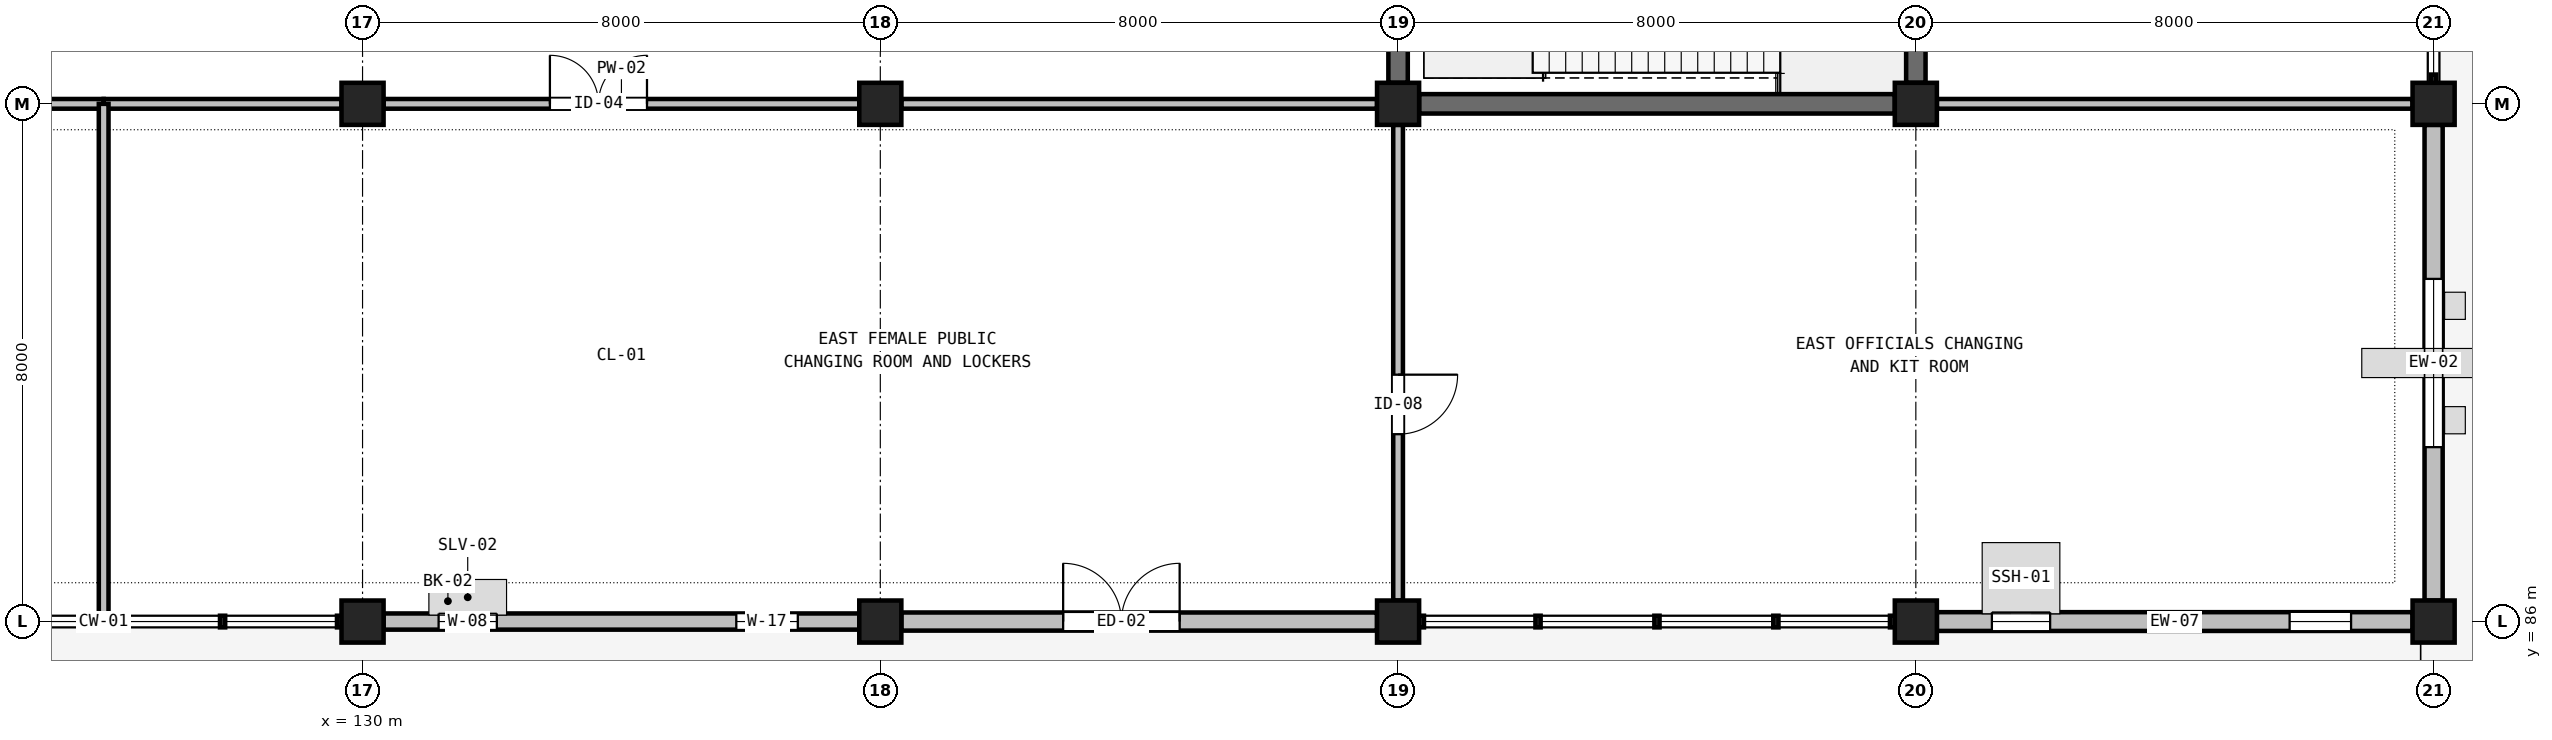
"""IFC4 building model, lengths in metres.
Left out: names, types, materials, properties, quantities, classifications, styles, units other than length and angle.
Written with IfcOpenShell. Run it as: python <this file> out.ifc"""

import sys

from ifc_helpers import new_model, si_unit, direction, frame, frame_2d, origin, origin_2d, place, context, subcontext, project, spatial, rectangle, circle, extrude, element, fill, save


model = new_model("IFC4")
c1 = context("Model", 3, precision=1e-05, world=origin(), true_north=direction((0.0, 1.0)))
c2 = subcontext(c1, "Body", "Model", "MODEL_VIEW")
j1 = project(units=[si_unit("LENGTHUNIT", "METRE"), si_unit("PLANEANGLEUNIT", "RADIAN")], contexts=[c1])
p1 = place(None, origin())
s1 = spatial("IfcSite", under=j1, at=p1, CompositionType="ELEMENT")
p2 = place(p1, origin())
s2 = spatial("IfcBuilding", under=s1, at=p2, CompositionType="ELEMENT")
p3 = place(p2, origin())
s3 = spatial("IfcBuildingStorey", under=s2, at=p3, CompositionType="ELEMENT", Elevation=0.0)
for number, where, z_axis, x_axis in (
    (1, (130.0, 86.0, 0.0), (0.0, 0.0, 1.0), (1.0, 0.0, 0.0)),
    (2, (130.0, 94.0, 0.0), (0.0, 0.0, 1.0), (1.0, 0.0, 0.0)),
    (3, (138.0, 86.0, 0.0), (0.0, 0.0, 1.0), (1.0, 0.0, 0.0)),
    (4, (138.0, 94.0, 0.0), (0.0, 0.0, 1.0), (1.0, 0.0, 0.0)),
    (5, (146.0, 86.0, 0.0), (0.0, 0.0, 1.0), (1.0, 0.0, 0.0)),
    (6, (146.0, 94.0, 0.0), (0.0, 0.0, 1.0), (1.0, 0.0, 0.0)),
    (7, (154.0, 86.0, 0.0), (0.0, 0.0, 1.0), (1.0, 0.0, 0.0)),
    (8, (154.0, 94.0, 0.0), (0.0, 0.0, 1.0), (1.0, 0.0, 0.0)),
    (9, (162.0, 86.0, 0.0), (0.0, 0.0, 1.0), (1.0, 0.0, 0.0)),
    (10, (162.0, 94.0, 0.0), (0.0, 0.0, 1.0), (1.0, 0.0, 0.0)),
):
    element("IfcColumn", number, at=place(p3, frame(where, z_axis=z_axis, x_axis=x_axis)), inside=s3, PredefinedType="COLUMN", context=c2, shape_type="SweptSolid", body=[
        extrude(circle(Radius=0.325, at=origin_2d()), origin(), (0.0, 0.0, 1.0), 5.4),
    ])
p4 = place(p3, frame((130.325, 86.0, 0.0), z_axis=(0.0, 0.0, 1.0), x_axis=(1.0, 0.0, 0.0)))
e11 = element("IfcWall", 11, at=p4, inside=s3, PredefinedType="SOLIDWALL", context=c2, shape_type="SweptSolid", body=[
    extrude(rectangle(XDim=7.35, YDim=0.25, at=frame_2d((3.675, 0.0))), origin(), (0.0, 0.0, 1.0), 4.24),
])
p5 = place(p4, frame((0.85, 0.0, 1.5)))
e12 = element("IfcOpeningElement", 12, at=p5, cuts=e11, PredefinedType="OPENING", context=c2, shape_type="SweptSolid", body=[
    extrude(rectangle(XDim=0.9, YDim=1.2, at=frame_2d((0.45, 0.6))), frame((0.0, 0.135, 0.0), z_axis=(0.0, -1.0, 0.0), x_axis=(1.0, 0.0, 0.0)), (0.0, 0.0, 1.0), 0.27),
])
p6 = place(p4, frame((5.45, 0.0, 1.05)))
e13 = element("IfcOpeningElement", 13, at=p6, cuts=e11, PredefinedType="OPENING", context=c2, shape_type="SweptSolid", body=[
    extrude(rectangle(XDim=0.95, YDim=1.65, at=frame_2d((0.475, 0.825))), frame((0.0, 0.135, 0.0), z_axis=(0.0, -1.0, 0.0), x_axis=(1.0, 0.0, 0.0)), (0.0, 0.0, 1.0), 0.27),
])
p7 = place(p3, frame((138.325, 86.0, 0.0), z_axis=(0.0, 0.0, 1.0), x_axis=(1.0, 0.0, 0.0)))
e14 = element("IfcWall", 14, at=p7, inside=s3, PredefinedType="SOLIDWALL", context=c2, shape_type="SweptSolid", body=[
    extrude(rectangle(XDim=7.35, YDim=0.28, at=frame_2d((3.675, 0.0))), origin(), (0.0, 0.0, 1.0), 4.24),
])
p8 = place(p7, frame((2.5, 0.0, 0.0)))
e15 = element("IfcOpeningElement", 15, at=p8, cuts=e14, PredefinedType="OPENING", context=c2, shape_type="SweptSolid", body=[
    extrude(rectangle(XDim=1.8, YDim=2.3, at=frame_2d((0.9, 1.15))), frame((0.0, 0.15, 0.0), z_axis=(0.0, -1.0, 0.0), x_axis=(1.0, 0.0, 0.0)), (0.0, 0.0, 1.0), 0.3),
])
p9 = place(p3, frame((154.325, 86.0, 0.0), z_axis=(0.0, 0.0, 1.0), x_axis=(1.0, 0.0, 0.0)))
e16 = element("IfcWall", 16, at=p9, inside=s3, PredefinedType="SOLIDWALL", context=c2, shape_type="SweptSolid", body=[
    extrude(rectangle(XDim=7.35, YDim=0.29, at=frame_2d((3.675, 0.0))), origin(), (0.0, 0.0, 1.0), 4.14),
])
p10 = place(p9, frame((0.85, 0.0, 1.5)))
e17 = element("IfcOpeningElement", 17, at=p10, cuts=e16, PredefinedType="OPENING", context=c2, shape_type="SweptSolid", body=[
    extrude(rectangle(XDim=0.9, YDim=1.2, at=frame_2d((0.45, 0.6))), frame((0.0, 0.155, 0.0), z_axis=(0.0, -1.0, 0.0), x_axis=(1.0, 0.0, 0.0)), (0.0, 0.0, 1.0), 0.31),
])
p11 = place(p9, frame((5.45, 0.0, 1.05)))
e18 = element("IfcOpeningElement", 18, at=p11, cuts=e16, PredefinedType="OPENING", context=c2, shape_type="SweptSolid", body=[
    extrude(rectangle(XDim=0.95, YDim=1.65, at=frame_2d((0.475, 0.825))), frame((0.0, 0.155, 0.0), z_axis=(0.0, -1.0, 0.0), x_axis=(1.0, 0.0, 0.0)), (0.0, 0.0, 1.0), 0.31),
])
p12 = place(p3, frame((162.0, 86.325, 0.0), z_axis=(0.0, 0.0, 1.0), x_axis=(0.0, 1.0, 0.0)))
e19 = element("IfcWall", 19, at=p12, inside=s3, PredefinedType="SOLIDWALL", context=c2, shape_type="SweptSolid", body=[
    extrude(rectangle(XDim=7.35, YDim=0.28, at=frame_2d((3.675, 0.0))), origin(), (0.0, 0.0, 1.0), 4.42),
])
p13 = place(p12, frame((2.37, 0.0, 2.65)))
e20 = element("IfcOpeningElement", 20, at=p13, cuts=e19, PredefinedType="OPENING", context=c2, shape_type="SweptSolid", body=[
    extrude(rectangle(XDim=2.6, YDim=1.1, at=frame_2d((1.3, 0.55))), frame((0.0, 0.15, 0.0), z_axis=(0.0, -1.0, 0.0), x_axis=(1.0, 0.0, 0.0)), (0.0, 0.0, 1.0), 0.3),
])
for number, where, z_axis, x_axis in (
    (21, (146.325, 94.0, 0.0), (0.0, 0.0, 1.0), (1.0, 0.0, 0.0)),
    (22, (146.0, 94.325, 0.0), (0.0, 0.0, 1.0), (0.0, 1.0, 0.0)),
    (23, (154.0, 94.325, 0.0), (0.0, 0.0, 1.0), (0.0, 1.0, 0.0)),
):
    element("IfcWall", number, at=place(p3, frame(where, z_axis=z_axis, x_axis=x_axis)), inside=s3, PredefinedType="SHEAR", context=c2, shape_type="SweptSolid", body=[
        extrude(rectangle(XDim=7.35, YDim=0.3, at=frame_2d((3.675, 0.0))), origin(), (0.0, 0.0, 1.0), 5.18),
    ])
for number, where, z_axis, x_axis in (
    (24, (122.325, 94.0, 0.0), (0.0, 0.0, 1.0), (1.0, 0.0, 0.0)),
    (25, (126.0, 94.0, 0.0), (0.0, 0.0, 1.0), (1.0, 0.0, 0.0)),
):
    element("IfcWall", number, at=place(p3, frame(where, z_axis=z_axis, x_axis=x_axis)), inside=s3, PredefinedType="PARTITIONING", context=c2, shape_type="SweptSolid", body=[
        extrude(rectangle(XDim=3.675, YDim=0.15, at=frame_2d((1.837, 0.0))), origin(), (0.0, 0.0, 1.0), 4.24),
    ])
p14 = place(p3, frame((130.325, 94.0, 0.0), z_axis=(0.0, 0.0, 1.0), x_axis=(1.0, 0.0, 0.0)))
e26 = element("IfcWall", 26, at=p14, inside=s3, PredefinedType="PARTITIONING", context=c2, shape_type="SweptSolid", body=[
    extrude(rectangle(XDim=7.35, YDim=0.15, at=frame_2d((3.675, 0.0))), origin(), (0.0, 0.0, 1.0), 4.64),
])
p15 = place(p14, frame((2.57, 0.0, 0.0)))
e27 = element("IfcOpeningElement", 27, at=p15, cuts=e26, PredefinedType="OPENING", context=c2, shape_type="SweptSolid", body=[
    extrude(rectangle(XDim=1.5, YDim=2.2, at=frame_2d((0.75, 1.1))), frame((0.0, 0.085, 0.0), z_axis=(0.0, -1.0, 0.0), x_axis=(1.0, 0.0, 0.0)), (0.0, 0.0, 1.0), 0.17),
])
p16 = place(p3, frame((138.325, 94.0, 0.0), z_axis=(0.0, 0.0, 1.0), x_axis=(1.0, 0.0, 0.0)))
e28 = element("IfcWall", 28, at=p16, inside=s3, PredefinedType="PARTITIONING", context=c2, shape_type="SweptSolid", body=[
    extrude(rectangle(XDim=7.35, YDim=0.15, at=frame_2d((3.675, 0.0))), origin(), (0.0, 0.0, 1.0), 4.54),
])
p17 = place(p3, frame((154.325, 94.0, 0.0), z_axis=(0.0, 0.0, 1.0), x_axis=(1.0, 0.0, 0.0)))
e29 = element("IfcWall", 29, at=p17, inside=s3, PredefinedType="PARTITIONING", context=c2, shape_type="SweptSolid", body=[
    extrude(rectangle(XDim=7.35, YDim=0.15, at=frame_2d((3.675, 0.0))), origin(), (0.0, 0.0, 1.0), 4.34),
])
p18 = place(p3, frame((126.0, 86.0, 0.0), z_axis=(0.0, 0.0, 1.0), x_axis=(0.0, 1.0, 0.0)))
e30 = element("IfcWall", 30, at=p18, inside=s3, PredefinedType="PARTITIONING", context=c2, shape_type="SweptSolid", body=[
    extrude(rectangle(XDim=8.0, YDim=0.15, at=frame_2d((4.0, 0.0))), origin(), (0.0, 0.0, 1.0), 5.1),
])
p19 = place(p3, frame((146.0, 86.325, 0.0), z_axis=(0.0, 0.0, 1.0), x_axis=(0.0, 1.0, 0.0)))
e31 = element("IfcWall", 31, at=p19, inside=s3, PredefinedType="PARTITIONING", context=c2, shape_type="SweptSolid", body=[
    extrude(rectangle(XDim=7.35, YDim=0.15, at=frame_2d((3.675, 0.0))), origin(), (0.0, 0.0, 1.0), 4.29),
])
p20 = place(p19, frame((2.57, 0.0, 0.0)))
e32 = element("IfcOpeningElement", 32, at=p20, cuts=e31, PredefinedType="OPENING", context=c2, shape_type="SweptSolid", body=[
    extrude(rectangle(XDim=0.92, YDim=2.12, at=frame_2d((0.46, 1.06))), frame((0.0, 0.085, 0.0), z_axis=(0.0, -1.0, 0.0), x_axis=(1.0, 0.0, 0.0)), (0.0, 0.0, 1.0), 0.17),
])
p21 = place(p5, origin())
e33 = element("IfcWindow", 33, at=p21, inside=s3, PartitioningType="SINGLE_PANEL", PredefinedType="WINDOW", context=c2, shape_type="SweptSolid", body=[
    extrude(rectangle(XDim=0.9, YDim=1.2, at=frame_2d((0.45, 0.6))), frame((0.0, 0.03, 0.0), z_axis=(0.0, -1.0, 0.0), x_axis=(1.0, 0.0, 0.0)), (0.0, 0.0, 1.0), 0.06),
])
fill(e12, e33)
p22 = place(p6, origin())
e34 = element("IfcWindow", 34, at=p22, inside=s3, PartitioningType="SINGLE_PANEL", PredefinedType="WINDOW", context=c2, shape_type="SweptSolid", body=[
    extrude(rectangle(XDim=0.95, YDim=1.65, at=frame_2d((0.475, 0.825))), frame((0.0, 0.03, 0.0), z_axis=(0.0, -1.0, 0.0), x_axis=(1.0, 0.0, 0.0)), (0.0, 0.0, 1.0), 0.06),
])
fill(e13, e34)
p23 = place(p8, origin())
e35 = element("IfcDoor", 35, at=p23, inside=s3, OperationType="DOUBLE_DOOR_SINGLE_SWING", PredefinedType="DOOR", context=c2, shape_type="SweptSolid", body=[
    extrude(rectangle(XDim=1.8, YDim=2.3, at=frame_2d((0.9, 1.15))), frame((0.0, 0.025, 0.0), z_axis=(0.0, -1.0, 0.0), x_axis=(1.0, 0.0, 0.0)), (0.0, 0.0, 1.0), 0.05),
])
fill(e15, e35)
p24 = place(p10, origin())
e36 = element("IfcWindow", 36, at=p24, inside=s3, PartitioningType="SINGLE_PANEL", PredefinedType="WINDOW", context=c2, shape_type="SweptSolid", body=[
    extrude(rectangle(XDim=0.9, YDim=1.2, at=frame_2d((0.45, 0.6))), frame((0.0, 0.03, 0.0), z_axis=(0.0, -1.0, 0.0), x_axis=(1.0, 0.0, 0.0)), (0.0, 0.0, 1.0), 0.06),
])
fill(e17, e36)
p25 = place(p11, origin())
e37 = element("IfcWindow", 37, at=p25, inside=s3, PartitioningType="SINGLE_PANEL", PredefinedType="WINDOW", context=c2, shape_type="SweptSolid", body=[
    extrude(rectangle(XDim=0.95, YDim=1.65, at=frame_2d((0.475, 0.825))), frame((0.0, 0.03, 0.0), z_axis=(0.0, -1.0, 0.0), x_axis=(1.0, 0.0, 0.0)), (0.0, 0.0, 1.0), 0.06),
])
fill(e18, e37)
p26 = place(p13, origin())
e38 = element("IfcWindow", 38, at=p26, inside=s3, PartitioningType="SINGLE_PANEL", PredefinedType="WINDOW", context=c2, shape_type="SweptSolid", body=[
    extrude(rectangle(XDim=2.6, YDim=1.1, at=frame_2d((1.3, 0.55))), frame((0.0, 0.03, 0.0), z_axis=(0.0, -1.0, 0.0), x_axis=(1.0, 0.0, 0.0)), (0.0, 0.0, 1.0), 0.06),
])
fill(e20, e38)
p27 = place(p15, origin())
e39 = element("IfcDoor", 39, at=p27, inside=s3, OperationType="DOUBLE_DOOR_SINGLE_SWING", PredefinedType="DOOR", context=c2, shape_type="SweptSolid", body=[
    extrude(rectangle(XDim=1.5, YDim=2.2, at=frame_2d((0.75, 1.1))), frame((0.0, 0.025, 0.0), z_axis=(0.0, -1.0, 0.0), x_axis=(1.0, 0.0, 0.0)), (0.0, 0.0, 1.0), 0.05),
])
fill(e27, e39)
p28 = place(p20, frame((0.92, 0.0, 0.0), z_axis=(0.0, 0.0, 1.0), x_axis=(-1.0, 0.0, 0.0)))
e40 = element("IfcDoor", 40, at=p28, inside=s3, OperationType="SINGLE_SWING_RIGHT", PredefinedType="DOOR", context=c2, shape_type="SweptSolid", body=[
    extrude(rectangle(XDim=0.92, YDim=2.12, at=frame_2d((0.46, 1.06))), frame((0.0, 0.025, 0.0), z_axis=(0.0, -1.0, 0.0), x_axis=(1.0, 0.0, 0.0)), (0.0, 0.0, 1.0), 0.05),
])
fill(e32, e40)
save(model, sys.argv[1])
